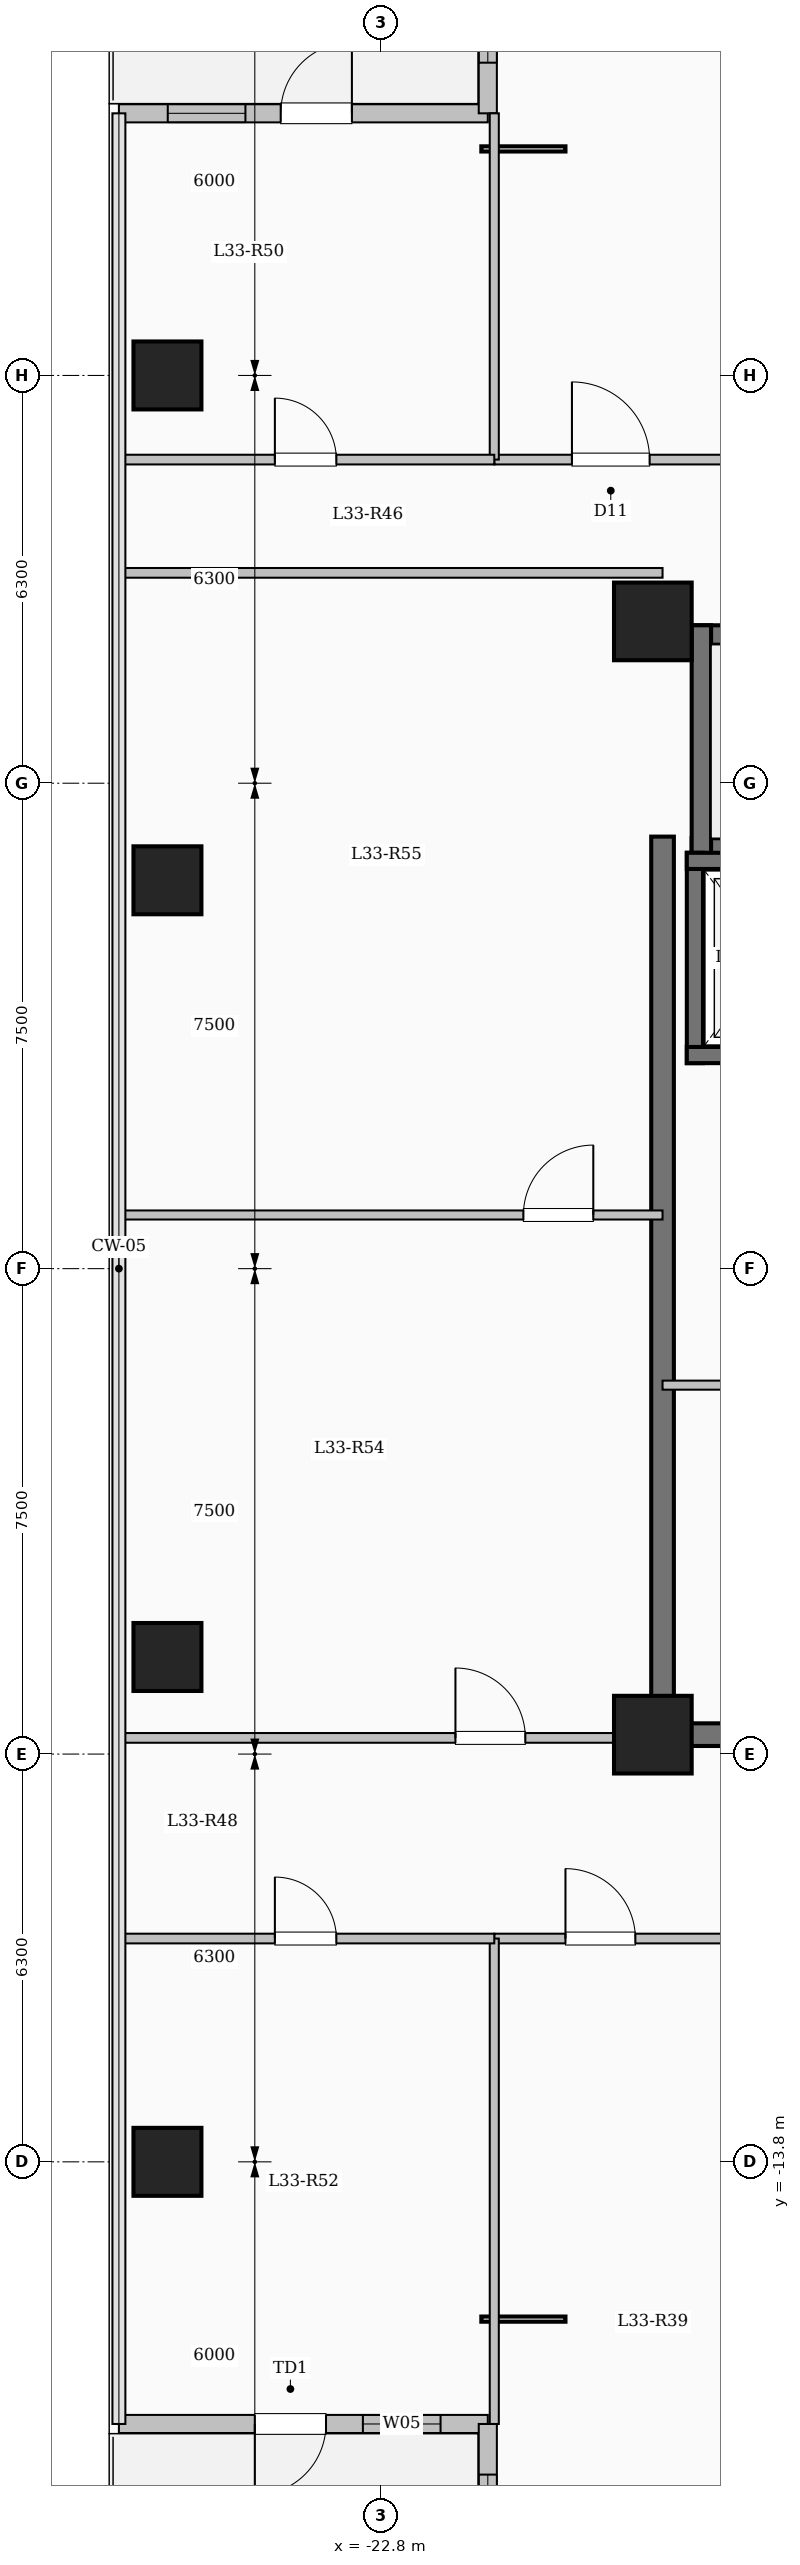
"""IFC4 building model, lengths in metres.
Left out: names, types, materials, properties, quantities, classifications, styles, units other than length and angle.
Written with IfcOpenShell. Run it as: python <this file> out.ifc"""

import sys

from ifc_helpers import new_model, si_unit, direction, frame, frame_2d, origin, origin_2d, place, context, subcontext, project, spatial, rectangle, extrude, element, fill, save


model = new_model("IFC4")
c1 = context("Model", 3, precision=1e-05, world=origin(), true_north=direction((0.0, 1.0)))
c2 = subcontext(c1, "Body", "Model", "MODEL_VIEW")
j1 = project(units=[si_unit("LENGTHUNIT", "METRE"), si_unit("PLANEANGLEUNIT", "RADIAN")], contexts=[c1])
p1 = place(None, origin())
s1 = spatial("IfcSite", under=j1, at=p1, CompositionType="ELEMENT")
p2 = place(p1, origin())
s2 = spatial("IfcBuilding", under=s1, at=p2, CompositionType="ELEMENT")
p3 = place(p2, frame((0.0, 0.0, 123.0)))
s3 = spatial("IfcBuildingStorey", under=s2, at=p3, CompositionType="ELEMENT", Elevation=123.0)
for number, where, z_axis, x_axis in (
    (1, (-18.6, -7.2, 0.0), (0.0, 0.0, 1.0), (1.0, 0.0, 0.0)),
    (2, (-18.6, 10.0, 0.0), (0.0, 0.0, 1.0), (1.0, 0.0, 0.0)),
):
    element("IfcColumn", number, at=place(p3, frame(where, z_axis=z_axis, x_axis=x_axis)), inside=s3, PredefinedType="COLUMN", context=c2, shape_type="SweptSolid", body=[
        extrude(rectangle(XDim=1.2, YDim=1.2, at=origin_2d()), origin(), (0.0, 0.0, 1.0), 4.5),
    ])
for number, where, z_axis, x_axis in (
    (3, (-26.1, -13.8, 0.0), (0.0, 0.0, 1.0), (1.0, 0.0, 0.0)),
    (4, (-26.1, -6.0, 0.0), (0.0, 0.0, 1.0), (1.0, 0.0, 0.0)),
    (5, (-26.1, 6.0, 0.0), (0.0, 0.0, 1.0), (1.0, 0.0, 0.0)),
    (6, (-26.1, 13.8, 0.0), (0.0, 0.0, 1.0), (1.0, 0.0, 0.0)),
):
    element("IfcColumn", number, at=place(p3, frame(where, z_axis=z_axis, x_axis=x_axis)), inside=s3, PredefinedType="COLUMN", context=c2, shape_type="SweptSolid", body=[
        extrude(rectangle(XDim=1.05, YDim=1.05, at=origin_2d()), origin(), (0.0, 0.0, 1.0), 4.5),
    ])
p4 = place(p3, frame((-21.15, -17.85, 0.0), z_axis=(0.0, 0.0, 1.0), x_axis=(-1.0, 0.0, 0.0)))
e7 = element("IfcWall", 7, at=p4, inside=s3, PredefinedType="SOLIDWALL", context=c2, shape_type="SweptSolid", body=[
    extrude(rectangle(XDim=5.7, YDim=0.28, at=frame_2d((2.85, 0.0))), origin(), (0.0, 0.0, 1.0), 4.2),
])
p5 = place(p4, frame((2.5, 0.0, 0.0)))
e8 = element("IfcOpeningElement", 8, at=p5, cuts=e7, PredefinedType="OPENING", context=c2, shape_type="SweptSolid", body=[
    extrude(rectangle(XDim=1.1, YDim=2.2, at=frame_2d((0.55, 1.1))), frame((0.0, 0.15, 0.0), z_axis=(0.0, -1.0, 0.0), x_axis=(1.0, 0.0, 0.0)), (0.0, 0.0, 1.0), 0.3),
])
p6 = place(p4, frame((0.73, 0.0, 0.95)))
e9 = element("IfcOpeningElement", 9, at=p6, cuts=e7, PredefinedType="OPENING", context=c2, shape_type="SweptSolid", body=[
    extrude(rectangle(XDim=1.2, YDim=1.5, at=frame_2d((0.6, 0.75))), frame((0.0, 0.15, 0.0), z_axis=(0.0, -1.0, 0.0), x_axis=(1.0, 0.0, 0.0)), (0.0, 0.0, 1.0), 0.3),
])
p7 = place(p3, frame((-26.85, 17.85, 0.0), z_axis=(0.0, 0.0, 1.0), x_axis=(1.0, 0.0, 0.0)))
e10 = element("IfcWall", 10, at=p7, inside=s3, PredefinedType="SOLIDWALL", context=c2, shape_type="SweptSolid", body=[
    extrude(rectangle(XDim=5.7, YDim=0.28, at=frame_2d((2.85, 0.0))), origin(), (0.0, 0.0, 1.0), 4.2),
])
p8 = place(p7, frame((2.5, 0.0, 0.0)))
e11 = element("IfcOpeningElement", 11, at=p8, cuts=e10, PredefinedType="OPENING", context=c2, shape_type="SweptSolid", body=[
    extrude(rectangle(XDim=1.1, YDim=2.2, at=frame_2d((0.55, 1.1))), frame((0.0, 0.15, 0.0), z_axis=(0.0, -1.0, 0.0), x_axis=(1.0, 0.0, 0.0)), (0.0, 0.0, 1.0), 0.3),
])
p9 = place(p7, frame((0.755, 0.0, 0.95)))
e12 = element("IfcOpeningElement", 12, at=p9, cuts=e10, PredefinedType="OPENING", context=c2, shape_type="SweptSolid", body=[
    extrude(rectangle(XDim=1.2, YDim=1.5, at=frame_2d((0.6, 0.75))), frame((0.0, 0.15, 0.0), z_axis=(0.0, -1.0, 0.0), x_axis=(1.0, 0.0, 0.0)), (0.0, 0.0, 1.0), 0.3),
])
p10 = place(p3, frame((-21.15, 17.85, 0.0), z_axis=(0.0, 0.0, 1.0), x_axis=(0.0, 1.0, 0.0)))
e13 = element("IfcWall", 13, at=p10, inside=s3, PredefinedType="SOLIDWALL", context=c2, shape_type="SweptSolid", body=[
    extrude(rectangle(XDim=4.2, YDim=0.28, at=frame_2d((2.1, 0.0))), origin(), (0.0, 0.0, 1.0), 4.2),
])
p11 = place(p10, frame((0.782, 0.0, 0.85)))
e14 = element("IfcOpeningElement", 14, at=p11, cuts=e13, PredefinedType="OPENING", context=c2, shape_type="SweptSolid", body=[
    extrude(rectangle(XDim=2.6, YDim=2.4, at=frame_2d((1.3, 1.2))), frame((0.0, 0.15, 0.0), z_axis=(0.0, -1.0, 0.0), x_axis=(1.0, 0.0, 0.0)), (0.0, 0.0, 1.0), 0.3),
])
p12 = place(p3, frame((-21.15, -22.05, 0.0), z_axis=(0.0, 0.0, 1.0), x_axis=(0.0, 1.0, 0.0)))
e15 = element("IfcWall", 15, at=p12, inside=s3, PredefinedType="SOLIDWALL", context=c2, shape_type="SweptSolid", body=[
    extrude(rectangle(XDim=4.2, YDim=0.28, at=frame_2d((2.1, 0.0))), origin(), (0.0, 0.0, 1.0), 4.2),
])
p13 = place(p12, frame((0.818, 0.0, 0.85)))
e16 = element("IfcOpeningElement", 16, at=p13, cuts=e15, PredefinedType="OPENING", context=c2, shape_type="SweptSolid", body=[
    extrude(rectangle(XDim=2.6, YDim=2.4, at=frame_2d((1.3, 1.2))), frame((0.0, 0.15, 0.0), z_axis=(0.0, -1.0, 0.0), x_axis=(1.0, 0.0, 0.0)), (0.0, 0.0, 1.0), 0.3),
])
p14 = place(p3, frame((-18.0, 9.79, 0.0), z_axis=(0.0, 0.0, 1.0), x_axis=(1.0, 0.0, 0.0)))
e17 = element("IfcWall", 17, at=p14, inside=s3, PredefinedType="SHEAR", context=c2, shape_type="SweptSolid", body=[
    extrude(rectangle(XDim=8.0, YDim=0.3, at=frame_2d((4.0, 0.0))), origin(), (0.0, 0.0, 1.0), 4.5),
])
p15 = place(p3, frame((-18.0, 6.5, 0.0), z_axis=(0.0, 0.0, 1.0), x_axis=(1.0, 0.0, 0.0)))
e18 = element("IfcWall", 18, at=p15, inside=s3, PredefinedType="SHEAR", context=c2, shape_type="SweptSolid", body=[
    extrude(rectangle(XDim=8.0, YDim=0.3, at=frame_2d((4.0, 0.0))), origin(), (0.0, 0.0, 1.0), 4.5),
])
p16 = place(p15, frame((6.45, 0.0, 0.0)))
e19 = element("IfcOpeningElement", 19, at=p16, cuts=e18, PredefinedType="OPENING", context=c2, shape_type="SweptSolid", body=[
    extrude(rectangle(XDim=1.0, YDim=2.15, at=frame_2d((0.5, 1.075))), frame((0.0, 0.16, 0.0), z_axis=(0.0, -1.0, 0.0), x_axis=(1.0, 0.0, 0.0)), (0.0, 0.0, 1.0), 0.32),
])
p17 = place(p3, frame((-17.85, 6.35, 0.0), z_axis=(0.0, 0.0, 1.0), x_axis=(0.0, 1.0, 0.0)))
e20 = element("IfcWall", 20, at=p17, inside=s3, PredefinedType="SHEAR", context=c2, shape_type="SweptSolid", body=[
    extrude(rectangle(XDim=3.59, YDim=0.3, at=frame_2d((1.795, 0.0))), origin(), (0.0, 0.0, 1.0), 4.5),
])
p18 = place(p3, frame((-17.95, 3.175, 0.0), z_axis=(0.0, 0.0, 1.0), x_axis=(0.0, 1.0, 0.0)))
e21 = element("IfcWall", 21, at=p18, inside=s3, PredefinedType="SHEAR", context=c2, shape_type="SweptSolid", body=[
    extrude(rectangle(XDim=3.25, YDim=0.25, at=frame_2d((1.625, 0.0))), origin(), (0.0, 0.0, 1.0), 4.5),
])
for number, where, z_axis, x_axis in (
    (22, (-18.075, 3.3, 0.0), (0.0, 0.0, 1.0), (1.0, 0.0, 0.0)),
    (23, (-18.075, 6.3, 0.0), (0.0, 0.0, 1.0), (1.0, 0.0, 0.0)),
):
    element("IfcWall", number, at=place(p3, frame(where, z_axis=z_axis, x_axis=x_axis)), inside=s3, PredefinedType="SHEAR", context=c2, shape_type="SweptSolid", body=[
        extrude(rectangle(XDim=2.55, YDim=0.25, at=frame_2d((1.275, 0.0))), origin(), (0.0, 0.0, 1.0), 4.5),
    ])
p19 = place(p3, frame((-18.45, -7.375, 0.0), z_axis=(0.0, 0.0, 1.0), x_axis=(0.0, 1.0, 0.0)))
e24 = element("IfcWall", 24, at=p19, inside=s3, PredefinedType="SHEAR", context=c2, shape_type="SweptSolid", body=[
    extrude(rectangle(XDim=14.05, YDim=0.35, at=frame_2d((7.025, 0.0))), origin(), (0.0, 0.0, 1.0), 4.5),
])
p20 = place(p3, frame((-18.625, -7.2, 0.0), z_axis=(0.0, 0.0, 1.0), x_axis=(1.0, 0.0, 0.0)))
e25 = element("IfcWall", 25, at=p20, inside=s3, PredefinedType="SHEAR", context=c2, shape_type="SweptSolid", body=[
    extrude(rectangle(XDim=8.55, YDim=0.35, at=frame_2d((4.275, 0.0))), origin(), (0.0, 0.0, 1.0), 4.5),
])
p21 = place(p3, frame((-18.45, -1.8, 0.0), z_axis=(0.0, 0.0, 1.0), x_axis=(1.0, 0.0, 0.0)))
e26 = element("IfcWall", 26, at=p21, inside=s3, PredefinedType="PARTITIONING", context=c2, shape_type="SweptSolid", body=[
    extrude(rectangle(XDim=3.05, YDim=0.14, at=frame_2d((1.525, 0.0))), origin(), (0.0, 0.0, 1.0), 4.2),
])
p22 = place(p21, frame((1.05, 0.0, 0.0)))
e27 = element("IfcOpeningElement", 27, at=p22, cuts=e26, PredefinedType="OPENING", context=c2, shape_type="SweptSolid", body=[
    extrude(rectangle(XDim=0.9, YDim=2.08, at=frame_2d((0.45, 1.04))), frame((0.0, 0.08, 0.0), z_axis=(0.0, -1.0, 0.0), x_axis=(1.0, 0.0, 0.0)), (0.0, 0.0, 1.0), 0.16),
])
p23 = place(p3, frame((-21.05, 12.5, 0.0), z_axis=(0.0, 0.0, 1.0), x_axis=(1.0, 0.0, 0.0)))
e28 = element("IfcWall", 28, at=p23, inside=s3, PredefinedType="PARTITIONING", context=c2, shape_type="SweptSolid", body=[
    extrude(rectangle(XDim=17.2, YDim=0.15, at=frame_2d((8.6, 0.0))), origin(), (0.0, 0.0, 1.0), 4.2),
])
p24 = place(p23, frame((1.2, 0.0, 0.0)))
e29 = element("IfcOpeningElement", 29, at=p24, cuts=e28, PredefinedType="OPENING", context=c2, shape_type="SweptSolid", body=[
    extrude(rectangle(XDim=1.2, YDim=2.15, at=frame_2d((0.6, 1.075))), frame((0.0, 0.085, 0.0), z_axis=(0.0, -1.0, 0.0), x_axis=(1.0, 0.0, 0.0)), (0.0, 0.0, 1.0), 0.17),
])
p25 = place(p23, frame((9.565, 0.0, 0.0)))
e30 = element("IfcOpeningElement", 30, at=p25, cuts=e28, PredefinedType="OPENING", context=c2, shape_type="SweptSolid", body=[
    extrude(rectangle(XDim=1.08, YDim=2.15, at=frame_2d((0.54, 1.075))), frame((0.0, 0.085, 0.0), z_axis=(0.0, -1.0, 0.0), x_axis=(1.0, 0.0, 0.0)), (0.0, 0.0, 1.0), 0.17),
])
p26 = place(p3, frame((-21.05, -10.35, 0.0), z_axis=(0.0, 0.0, 1.0), x_axis=(1.0, 0.0, 0.0)))
e31 = element("IfcWall", 31, at=p26, inside=s3, PredefinedType="PARTITIONING", context=c2, shape_type="SweptSolid", body=[
    extrude(rectangle(XDim=12.5, YDim=0.15, at=frame_2d((6.25, 0.0))), origin(), (0.0, 0.0, 1.0), 4.2),
])
p27 = place(p26, frame((1.1, 0.0, 0.0)))
e32 = element("IfcOpeningElement", 32, at=p27, cuts=e31, PredefinedType="OPENING", context=c2, shape_type="SweptSolid", body=[
    extrude(rectangle(XDim=1.08, YDim=2.15, at=frame_2d((0.54, 1.075))), frame((0.0, 0.085, 0.0), z_axis=(0.0, -1.0, 0.0), x_axis=(1.0, 0.0, 0.0)), (0.0, 0.0, 1.0), 0.17),
])
p28 = place(p26, frame((5.88, 0.0, 0.0)))
e33 = element("IfcOpeningElement", 33, at=p28, cuts=e31, PredefinedType="OPENING", context=c2, shape_type="SweptSolid", body=[
    extrude(rectangle(XDim=1.08, YDim=2.15, at=frame_2d((0.54, 1.075))), frame((0.0, 0.085, 0.0), z_axis=(0.0, -1.0, 0.0), x_axis=(1.0, 0.0, 0.0)), (0.0, 0.0, 1.0), 0.17),
])
p29 = place(p3, frame((-26.88, -7.25, 0.0), z_axis=(0.0, 0.0, 1.0), x_axis=(1.0, 0.0, 0.0)))
e34 = element("IfcWall", 34, at=p29, inside=s3, PredefinedType="PARTITIONING", context=c2, shape_type="SweptSolid", body=[
    extrude(rectangle(XDim=8.43, YDim=0.15, at=frame_2d((4.215, 0.0))), origin(), (0.0, 0.0, 1.0), 4.2),
])
p30 = place(p29, frame((5.23, 0.0, 0.0)))
e35 = element("IfcOpeningElement", 35, at=p30, cuts=e34, PredefinedType="OPENING", context=c2, shape_type="SweptSolid", body=[
    extrude(rectangle(XDim=1.08, YDim=2.15, at=frame_2d((0.54, 1.075))), frame((0.0, 0.085, 0.0), z_axis=(0.0, -1.0, 0.0), x_axis=(1.0, 0.0, 0.0)), (0.0, 0.0, 1.0), 0.17),
])
p31 = place(p3, frame((-26.88, 10.75, 0.0), z_axis=(0.0, 0.0, 1.0), x_axis=(1.0, 0.0, 0.0)))
e36 = element("IfcWall", 36, at=p31, inside=s3, PredefinedType="PARTITIONING", context=c2, shape_type="SweptSolid", body=[
    extrude(rectangle(XDim=8.43, YDim=0.15, at=frame_2d((4.215, 0.0))), origin(), (0.0, 0.0, 1.0), 4.2),
])
p32 = place(p3, frame((-21.05, -17.85, 0.0), z_axis=(0.0, 0.0, 1.0), x_axis=(0.0, 1.0, 0.0)))
e37 = element("IfcWall", 37, at=p32, inside=s3, PredefinedType="PARTITIONING", context=c2, shape_type="SweptSolid", body=[
    extrude(rectangle(XDim=7.5, YDim=0.14, at=frame_2d((3.75, 0.0))), origin(), (0.0, 0.0, 1.0), 4.2),
])
p33 = place(p3, frame((-21.05, 12.5, 0.0), z_axis=(0.0, 0.0, 1.0), x_axis=(0.0, 1.0, 0.0)))
e38 = element("IfcWall", 38, at=p33, inside=s3, PredefinedType="PARTITIONING", context=c2, shape_type="SweptSolid", body=[
    extrude(rectangle(XDim=5.35, YDim=0.14, at=frame_2d((2.675, 0.0))), origin(), (0.0, 0.0, 1.0), 4.2),
])
p34 = place(p3, frame((-26.88, 12.5, 0.0), z_axis=(0.0, 0.0, 1.0), x_axis=(1.0, 0.0, 0.0)))
e39 = element("IfcWall", 39, at=p34, inside=s3, PredefinedType="PARTITIONING", context=c2, shape_type="SweptSolid", body=[
    extrude(rectangle(XDim=5.83, YDim=0.15, at=frame_2d((2.915, 0.0))), origin(), (0.0, 0.0, 1.0), 4.2),
])
p35 = place(p34, frame((2.44, 0.0, 0.0)))
e40 = element("IfcOpeningElement", 40, at=p35, cuts=e39, PredefinedType="OPENING", context=c2, shape_type="SweptSolid", body=[
    extrude(rectangle(XDim=0.95, YDim=2.15, at=frame_2d((0.475, 1.075))), frame((0.0, 0.085, 0.0), z_axis=(0.0, -1.0, 0.0), x_axis=(1.0, 0.0, 0.0)), (0.0, 0.0, 1.0), 0.17),
])
p36 = place(p3, frame((-26.88, -10.35, 0.0), z_axis=(0.0, 0.0, 1.0), x_axis=(1.0, 0.0, 0.0)))
e41 = element("IfcWall", 41, at=p36, inside=s3, PredefinedType="PARTITIONING", context=c2, shape_type="SweptSolid", body=[
    extrude(rectangle(XDim=5.83, YDim=0.15, at=frame_2d((2.915, 0.0))), origin(), (0.0, 0.0, 1.0), 4.2),
])
p37 = place(p36, frame((2.44, 0.0, 0.0)))
e42 = element("IfcOpeningElement", 42, at=p37, cuts=e41, PredefinedType="OPENING", context=c2, shape_type="SweptSolid", body=[
    extrude(rectangle(XDim=0.95, YDim=2.15, at=frame_2d((0.475, 1.075))), frame((0.0, 0.085, 0.0), z_axis=(0.0, -1.0, 0.0), x_axis=(1.0, 0.0, 0.0)), (0.0, 0.0, 1.0), 0.17),
])
p38 = place(p3, frame((-26.88, 0.829, 0.0), z_axis=(0.0, 0.0, 1.0), x_axis=(1.0, 0.0, 0.0)))
e43 = element("IfcWall", 43, at=p38, inside=s3, PredefinedType="PARTITIONING", context=c2, shape_type="SweptSolid", body=[
    extrude(rectangle(XDim=8.43, YDim=0.14, at=frame_2d((4.215, 0.0))), origin(), (0.0, 0.0, 1.0), 4.2),
])
p39 = place(p38, frame((6.28, 0.0, 0.0)))
e44 = element("IfcOpeningElement", 44, at=p39, cuts=e43, PredefinedType="OPENING", context=c2, shape_type="SweptSolid", body=[
    extrude(rectangle(XDim=1.08, YDim=2.15, at=frame_2d((0.54, 1.075))), frame((0.0, 0.08, 0.0), z_axis=(0.0, -1.0, 0.0), x_axis=(1.0, 0.0, 0.0)), (0.0, 0.0, 1.0), 0.16),
])
p40 = place(p5, origin())
e45 = element("IfcDoor", 45, at=p40, inside=s3, OperationType="SINGLE_SWING_RIGHT", PredefinedType="DOOR", context=c2, shape_type="SweptSolid", body=[
    extrude(rectangle(XDim=1.1, YDim=2.2, at=frame_2d((0.55, 1.1))), frame((0.0, 0.025, 0.0), z_axis=(0.0, -1.0, 0.0), x_axis=(1.0, 0.0, 0.0)), (0.0, 0.0, 1.0), 0.05),
])
fill(e8, e45)
p41 = place(p6, origin())
e46 = element("IfcWindow", 46, at=p41, inside=s3, PartitioningType="SINGLE_PANEL", PredefinedType="WINDOW", context=c2, shape_type="SweptSolid", body=[
    extrude(rectangle(XDim=1.2, YDim=1.5, at=frame_2d((0.6, 0.75))), frame((0.0, 0.03, 0.0), z_axis=(0.0, -1.0, 0.0), x_axis=(1.0, 0.0, 0.0)), (0.0, 0.0, 1.0), 0.06),
])
fill(e9, e46)
p42 = place(p8, origin())
e47 = element("IfcDoor", 47, at=p42, inside=s3, OperationType="SINGLE_SWING_RIGHT", PredefinedType="DOOR", context=c2, shape_type="SweptSolid", body=[
    extrude(rectangle(XDim=1.1, YDim=2.2, at=frame_2d((0.55, 1.1))), frame((0.0, 0.025, 0.0), z_axis=(0.0, -1.0, 0.0), x_axis=(1.0, 0.0, 0.0)), (0.0, 0.0, 1.0), 0.05),
])
fill(e11, e47)
p43 = place(p9, origin())
e48 = element("IfcWindow", 48, at=p43, inside=s3, PartitioningType="SINGLE_PANEL", PredefinedType="WINDOW", context=c2, shape_type="SweptSolid", body=[
    extrude(rectangle(XDim=1.2, YDim=1.5, at=frame_2d((0.6, 0.75))), frame((0.0, 0.03, 0.0), z_axis=(0.0, -1.0, 0.0), x_axis=(1.0, 0.0, 0.0)), (0.0, 0.0, 1.0), 0.06),
])
fill(e12, e48)
p44 = place(p11, origin())
e49 = element("IfcWindow", 49, at=p44, inside=s3, PartitioningType="SINGLE_PANEL", PredefinedType="WINDOW", context=c2, shape_type="SweptSolid", body=[
    extrude(rectangle(XDim=2.6, YDim=2.4, at=frame_2d((1.3, 1.2))), frame((0.0, 0.03, 0.0), z_axis=(0.0, -1.0, 0.0), x_axis=(1.0, 0.0, 0.0)), (0.0, 0.0, 1.0), 0.06),
])
fill(e14, e49)
p45 = place(p13, origin())
e50 = element("IfcWindow", 50, at=p45, inside=s3, PartitioningType="SINGLE_PANEL", PredefinedType="WINDOW", context=c2, shape_type="SweptSolid", body=[
    extrude(rectangle(XDim=2.6, YDim=2.4, at=frame_2d((1.3, 1.2))), frame((0.0, 0.03, 0.0), z_axis=(0.0, -1.0, 0.0), x_axis=(1.0, 0.0, 0.0)), (0.0, 0.0, 1.0), 0.06),
])
fill(e16, e50)
p46 = place(p24, origin())
e51 = element("IfcDoor", 51, at=p46, inside=s3, OperationType="SINGLE_SWING_LEFT", PredefinedType="DOOR", context=c2, shape_type="SweptSolid", body=[
    extrude(rectangle(XDim=1.2, YDim=2.15, at=frame_2d((0.6, 1.075))), frame((0.0, 0.025, 0.0), z_axis=(0.0, -1.0, 0.0), x_axis=(1.0, 0.0, 0.0)), (0.0, 0.0, 1.0), 0.05),
])
fill(e29, e51)
p47 = place(p27, origin())
e52 = element("IfcDoor", 52, at=p47, inside=s3, OperationType="SINGLE_SWING_LEFT", PredefinedType="DOOR", context=c2, shape_type="SweptSolid", body=[
    extrude(rectangle(XDim=1.08, YDim=2.15, at=frame_2d((0.54, 1.075))), frame((0.0, 0.025, 0.0), z_axis=(0.0, -1.0, 0.0), x_axis=(1.0, 0.0, 0.0)), (0.0, 0.0, 1.0), 0.05),
])
fill(e32, e52)
p48 = place(p35, origin())
e53 = element("IfcDoor", 53, at=p48, inside=s3, OperationType="SINGLE_SWING_LEFT", PredefinedType="DOOR", context=c2, shape_type="SweptSolid", body=[
    extrude(rectangle(XDim=0.95, YDim=2.15, at=frame_2d((0.475, 1.075))), frame((0.0, 0.025, 0.0), z_axis=(0.0, -1.0, 0.0), x_axis=(1.0, 0.0, 0.0)), (0.0, 0.0, 1.0), 0.05),
])
fill(e40, e53)
p49 = place(p37, origin())
e54 = element("IfcDoor", 54, at=p49, inside=s3, OperationType="SINGLE_SWING_LEFT", PredefinedType="DOOR", context=c2, shape_type="SweptSolid", body=[
    extrude(rectangle(XDim=0.95, YDim=2.15, at=frame_2d((0.475, 1.075))), frame((0.0, 0.025, 0.0), z_axis=(0.0, -1.0, 0.0), x_axis=(1.0, 0.0, 0.0)), (0.0, 0.0, 1.0), 0.05),
])
fill(e42, e54)
p50 = place(p30, origin())
e55 = element("IfcDoor", 55, at=p50, inside=s3, OperationType="SINGLE_SWING_LEFT", PredefinedType="DOOR", context=c2, shape_type="SweptSolid", body=[
    extrude(rectangle(XDim=1.08, YDim=2.15, at=frame_2d((0.54, 1.075))), frame((0.0, 0.025, 0.0), z_axis=(0.0, -1.0, 0.0), x_axis=(1.0, 0.0, 0.0)), (0.0, 0.0, 1.0), 0.05),
])
fill(e35, e55)
p51 = place(p39, origin())
e56 = element("IfcDoor", 56, at=p51, inside=s3, OperationType="SINGLE_SWING_RIGHT", PredefinedType="DOOR", context=c2, shape_type="SweptSolid", body=[
    extrude(rectangle(XDim=1.08, YDim=2.15, at=frame_2d((0.54, 1.075))), frame((0.0, 0.025, 0.0), z_axis=(0.0, -1.0, 0.0), x_axis=(1.0, 0.0, 0.0)), (0.0, 0.0, 1.0), 0.05),
])
fill(e44, e56)
save(model, sys.argv[1])
